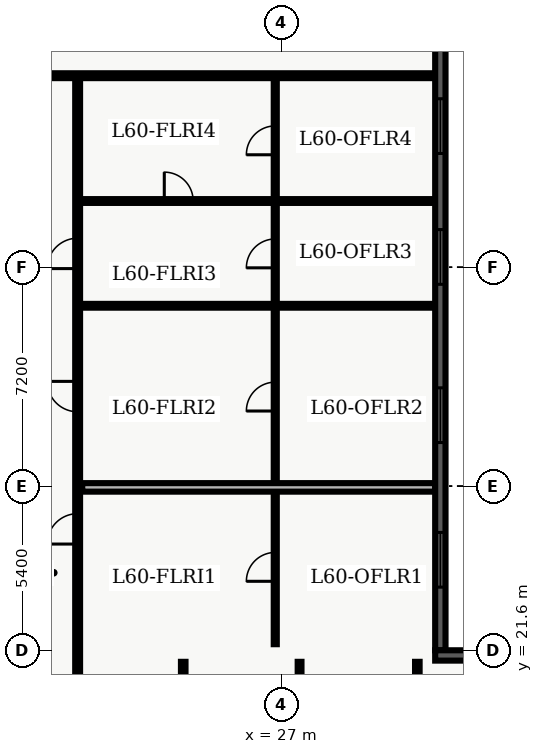
"""IFC4 building model, lengths in metres.
Left out: names, types, materials, properties, quantities, classifications, styles, units other than length and angle.
Written with IfcOpenShell. Run it as: python <this file> out.ifc"""

import sys

from ifc_helpers import new_model, entity, si_unit, converted_unit, direction, frame, origin_with_axes, origin_2d_with_axis, place, context, subcontext, project, spatial, polyline, rectangle, outline, extrude, element, fill, save


model = new_model("IFC4")
c1 = context("Model", 3, precision=1e-05, world=origin_with_axes(), true_north=direction((0.0, 1.0)))
c2 = subcontext(c1, "Body", "Model", "MODEL_VIEW")
j1 = project(units=[si_unit("LENGTHUNIT", "METRE"), converted_unit("PLANEANGLEUNIT", "DEGREE", entity("IfcPlaneAngleMeasure", 0.017), si_unit("PLANEANGLEUNIT", "RADIAN"), dimensions=[0, 0, 0, 0, 0, 0, 0])], contexts=[c1])
p1 = place(None, origin_with_axes())
s1 = spatial("IfcSite", under=j1, at=p1, CompositionType="ELEMENT")
p2 = place(p1, origin_with_axes())
s2 = spatial("IfcBuilding", under=s1, at=p2, CompositionType="ELEMENT")
p3 = place(p2, frame((0.0, 0.0, 244.2), z_axis=(0.0, 0.0, 1.0), x_axis=(1.0, 0.0, 0.0)))
s3 = spatial("IfcBuildingStorey", under=s2, at=p3, CompositionType="ELEMENT", Elevation=244.2)
p4 = place(p3, frame((7.1, 40.5, 0.0), z_axis=(0.0, 0.0, 1.0), x_axis=(1.0, 0.0, 0.0)))
e1 = element("IfcWall", 1, at=p4, inside=s3, PredefinedType="PARTITIONING", context=c2, shape_type="SweptSolid", body=[
    extrude(outline(polyline([(0.0, -0.08), (24.965, -0.08), (24.965, 0.08), (0.0, 0.08), (0.0, -0.08)])), origin_with_axes(), (0.0, 0.0, 1.0), 2.64),
])
p5 = place(p4, frame((4.38, 0.0, 0.0), z_axis=(0.0, 0.0, 1.0), x_axis=(1.0, 0.0, 0.0)))
e2 = element("IfcOpeningElement", 2, at=p5, cuts=e1, PredefinedType="OPENING", context=c2, shape_type="SweptSolid", body=[
    extrude(rectangle(XDim=1.0, YDim=0.18, at=origin_2d_with_axis()), origin_with_axes(), (0.0, 0.0, 1.0), 2.15),
])
p6 = place(p4, frame((7.566, 0.0, 0.0), z_axis=(0.0, 0.0, 1.0), x_axis=(1.0, 0.0, 0.0)))
e3 = element("IfcOpeningElement", 3, at=p6, cuts=e1, PredefinedType="OPENING", context=c2, shape_type="SweptSolid", body=[
    extrude(rectangle(XDim=1.0, YDim=0.18, at=origin_2d_with_axis()), origin_with_axes(), (0.0, 0.0, 1.0), 2.15),
])
p7 = place(p4, frame((11.129, 0.0, 0.0), z_axis=(0.0, 0.0, 1.0), x_axis=(1.0, 0.0, 0.0)))
e4 = element("IfcOpeningElement", 4, at=p7, cuts=e1, PredefinedType="OPENING", context=c2, shape_type="SweptSolid", body=[
    extrude(rectangle(XDim=1.0, YDim=0.18, at=origin_2d_with_axis()), origin_with_axes(), (0.0, 0.0, 1.0), 2.15),
])
p8 = place(p3, frame((20.3, 7.8, 0.0), z_axis=(0.0, 0.0, 1.0), x_axis=(0.0, 1.0, 0.0)))
e5 = element("IfcWall", 5, at=p8, inside=s3, PredefinedType="PARTITIONING", context=c2, shape_type="SweptSolid", body=[
    extrude(outline(polyline([(0.0, -0.08), (32.7, -0.08), (32.7, 0.08), (0.0, 0.08), (0.0, -0.08)])), origin_with_axes(), (0.0, 0.0, 1.0), 2.64),
])
p9 = place(p8, frame((17.794, 0.0, 0.0), z_axis=(0.0, 0.0, 1.0), x_axis=(1.0, 0.0, 0.0)))
e6 = element("IfcOpeningElement", 6, at=p9, cuts=e5, PredefinedType="OPENING", context=c2, shape_type="SweptSolid", body=[
    extrude(rectangle(XDim=1.0, YDim=0.18, at=origin_2d_with_axis()), origin_with_axes(), (0.0, 0.0, 1.0), 2.15),
])
p10 = place(p8, frame((22.145, 0.0, 0.0), z_axis=(0.0, 0.0, 1.0), x_axis=(1.0, 0.0, 0.0)))
e7 = element("IfcOpeningElement", 7, at=p10, cuts=e5, PredefinedType="OPENING", context=c2, shape_type="SweptSolid", body=[
    extrude(rectangle(XDim=1.0, YDim=0.18, at=origin_2d_with_axis()), origin_with_axes(), (0.0, 0.0, 1.0), 2.15),
])
p11 = place(p8, frame((26.855, 0.0, 0.0), z_axis=(0.0, 0.0, 1.0), x_axis=(1.0, 0.0, 0.0)))
e8 = element("IfcOpeningElement", 8, at=p11, cuts=e5, PredefinedType="OPENING", context=c2, shape_type="SweptSolid", body=[
    extrude(rectangle(XDim=1.0, YDim=0.18, at=origin_2d_with_axis()), origin_with_axes(), (0.0, 0.0, 1.0), 2.15),
])
p12 = place(p8, frame((5.775, 0.0, 0.0), z_axis=(0.0, 0.0, 1.0), x_axis=(1.0, 0.0, 0.0)))
e9 = element("IfcOpeningElement", 9, at=p12, cuts=e5, PredefinedType="OPENING", context=c2, shape_type="SweptSolid", body=[
    extrude(rectangle(XDim=1.05, YDim=0.18, at=origin_2d_with_axis()), origin_with_axes(), (0.0, 0.0, 1.0), 2.15),
])
p13 = place(p3, frame((26.8, 21.8, 0.0), z_axis=(0.0, 0.0, 1.0), x_axis=(0.0, 1.0, 0.0)))
e10 = element("IfcWall", 10, at=p13, inside=s3, PredefinedType="PARTITIONING", context=c2, shape_type="SweptSolid", body=[
    extrude(outline(polyline([(0.0, -0.05), (18.5, -0.05), (18.5, 0.05), (0.0, 0.05), (0.0, -0.05)])), origin_with_axes(), (0.0, 0.0, 1.0), 2.64),
])
p14 = place(p13, frame((2.544, 0.0, 0.0), z_axis=(0.0, 0.0, 1.0), x_axis=(1.0, 0.0, 0.0)))
e11 = element("IfcOpeningElement", 11, at=p14, cuts=e10, PredefinedType="OPENING", context=c2, shape_type="SweptSolid", body=[
    extrude(rectangle(XDim=0.95, YDim=0.12, at=origin_2d_with_axis()), origin_with_axes(), (0.0, 0.0, 1.0), 2.15),
])
p15 = place(p13, frame((8.145, 0.0, 0.0), z_axis=(0.0, 0.0, 1.0), x_axis=(1.0, 0.0, 0.0)))
e12 = element("IfcOpeningElement", 12, at=p15, cuts=e10, PredefinedType="OPENING", context=c2, shape_type="SweptSolid", body=[
    extrude(rectangle(XDim=0.95, YDim=0.12, at=origin_2d_with_axis()), origin_with_axes(), (0.0, 0.0, 1.0), 2.15),
])
p16 = place(p13, frame((12.855, 0.0, 0.0), z_axis=(0.0, 0.0, 1.0), x_axis=(1.0, 0.0, 0.0)))
e13 = element("IfcOpeningElement", 13, at=p16, cuts=e10, PredefinedType="OPENING", context=c2, shape_type="SweptSolid", body=[
    extrude(rectangle(XDim=0.95, YDim=0.12, at=origin_2d_with_axis()), origin_with_axes(), (0.0, 0.0, 1.0), 2.15),
])
p17 = place(p13, frame((16.574, 0.0, 0.0), z_axis=(0.0, 0.0, 1.0), x_axis=(1.0, 0.0, 0.0)))
e14 = element("IfcOpeningElement", 14, at=p17, cuts=e10, PredefinedType="OPENING", context=c2, shape_type="SweptSolid", body=[
    extrude(rectangle(XDim=0.95, YDim=0.12, at=origin_2d_with_axis()), origin_with_axes(), (0.0, 0.0, 1.0), 2.15),
])
p18 = place(p3, frame((20.45, 26.958, 0.0), z_axis=(0.0, 0.0, 1.0), x_axis=(1.0, 0.0, 0.0)))
e15 = element("IfcWall", 15, at=p18, inside=s3, PredefinedType="PARTITIONING", context=c2, shape_type="SweptSolid", body=[
    extrude(outline(polyline([(0.0, -0.14), (11.615, -0.14), (11.615, 0.14), (0.0, 0.14), (0.0, -0.14)])), origin_with_axes(), (0.0, 0.0, 1.0), 2.64),
])
p19 = place(p3, frame((20.45, 32.932, 0.0), z_axis=(0.0, 0.0, 1.0), x_axis=(1.0, 0.0, 0.0)))
e16 = element("IfcWall", 16, at=p19, inside=s3, PredefinedType="PARTITIONING", context=c2, shape_type="SweptSolid", body=[
    extrude(outline(polyline([(0.0, -0.062), (11.615, -0.062), (11.615, 0.062), (0.0, 0.062), (0.0, -0.062)])), origin_with_axes(), (0.0, 0.0, 1.0), 2.64),
])
p20 = place(p3, frame((20.45, 36.378, 0.0), z_axis=(0.0, 0.0, 1.0), x_axis=(1.0, 0.0, 0.0)))
e17 = element("IfcWall", 17, at=p20, inside=s3, PredefinedType="PARTITIONING", context=c2, shape_type="SweptSolid", body=[
    extrude(outline(polyline([(0.0, -0.062), (11.615, -0.062), (11.615, 0.062), (0.0, 0.062), (0.0, -0.062)])), origin_with_axes(), (0.0, 0.0, 1.0), 2.64),
])
p21 = place(p20, frame((3.175, 0.0, 0.0), z_axis=(0.0, 0.0, 1.0), x_axis=(1.0, 0.0, 0.0)))
e18 = element("IfcOpeningElement", 18, at=p21, cuts=e17, PredefinedType="OPENING", context=c2, shape_type="SweptSolid", body=[
    extrude(rectangle(XDim=0.95, YDim=0.145, at=origin_2d_with_axis()), origin_with_axes(), (0.0, 0.0, 1.0), 2.15),
])
p22 = place(p3, frame((23.773, 15.02, 0.0), z_axis=(0.0, 0.0, 1.0), x_axis=(0.0, 1.0, 0.0)))
e19 = element("IfcWall", 19, at=p22, inside=s3, PredefinedType="PARTITIONING", context=c2, shape_type="SweptSolid", body=[
    extrude(outline(polyline([(0.0, -0.075), (6.2, -0.075), (6.2, 0.075), (0.0, 0.075), (0.0, -0.075)])), origin_with_axes(), (0.0, 0.0, 1.0), 2.64),
])
p23 = place(p3, frame((27.6, 15.02, 0.0), z_axis=(0.0, 0.0, 1.0), x_axis=(0.0, 1.0, 0.0)))
e20 = element("IfcWall", 20, at=p23, inside=s3, PredefinedType="PARTITIONING", context=c2, shape_type="SweptSolid", body=[
    extrude(outline(polyline([(0.0, -0.062), (6.2, -0.062), (6.2, 0.062), (0.0, 0.062), (0.0, -0.062)])), origin_with_axes(), (0.0, 0.0, 1.0), 2.64),
])
p24 = place(p3, frame((31.473, 15.02, 0.0), z_axis=(0.0, 0.0, 1.0), x_axis=(0.0, 1.0, 0.0)))
e21 = element("IfcWall", 21, at=p24, inside=s3, PredefinedType="PARTITIONING", context=c2, shape_type="SweptSolid", body=[
    extrude(outline(polyline([(0.0, -0.075), (6.2, -0.075), (6.2, 0.075), (0.0, 0.075), (0.0, -0.075)])), origin_with_axes(), (0.0, 0.0, 1.0), 2.64),
])
p25 = place(p3, frame((32.23, 41.82, 0.0), z_axis=(0.0, 0.0, 1.0), x_axis=(0.0, -1.0, 0.0)))
e22 = element("IfcWall", 22, at=p25, inside=s3, PredefinedType="SOLIDWALL", context=c2, shape_type="SweptSolid", body=[
    extrude(outline(polyline([(0.0, -0.17), (20.22, -0.17), (20.22, 0.17), (0.0, 0.17), (0.0, -0.17)])), origin_with_axes(), (0.0, 0.0, 1.0), 3.6),
])
p26 = place(p25, frame((2.978, 0.0, 0.45), z_axis=(0.0, 0.0, 1.0), x_axis=(1.0, 0.0, 0.0)))
e23 = element("IfcOpeningElement", 23, at=p26, cuts=e22, PredefinedType="OPENING", context=c2, shape_type="SweptSolid", body=[
    extrude(rectangle(XDim=1.8, YDim=0.36, at=origin_2d_with_axis()), origin_with_axes(), (0.0, 0.0, 1.0), 2.1),
])
p27 = place(p25, frame((7.282, 0.0, 0.45), z_axis=(0.0, 0.0, 1.0), x_axis=(1.0, 0.0, 0.0)))
e24 = element("IfcOpeningElement", 24, at=p27, cuts=e22, PredefinedType="OPENING", context=c2, shape_type="SweptSolid", body=[
    extrude(rectangle(XDim=1.8, YDim=0.36, at=origin_2d_with_axis()), origin_with_axes(), (0.0, 0.0, 1.0), 2.1),
])
p28 = place(p25, frame((12.487, 0.0, 0.45), z_axis=(0.0, 0.0, 1.0), x_axis=(1.0, 0.0, 0.0)))
e25 = element("IfcOpeningElement", 25, at=p28, cuts=e22, PredefinedType="OPENING", context=c2, shape_type="SweptSolid", body=[
    extrude(rectangle(XDim=1.8, YDim=0.36, at=origin_2d_with_axis()), origin_with_axes(), (0.0, 0.0, 1.0), 2.1),
])
p29 = place(p25, frame((17.243, 0.0, 0.45), z_axis=(0.0, 0.0, 1.0), x_axis=(1.0, 0.0, 0.0)))
e26 = element("IfcOpeningElement", 26, at=p29, cuts=e22, PredefinedType="OPENING", context=c2, shape_type="SweptSolid", body=[
    extrude(rectangle(XDim=1.8, YDim=0.36, at=origin_2d_with_axis()), origin_with_axes(), (0.0, 0.0, 1.0), 2.1),
])
p30 = place(p3, frame((32.06, 21.43, 0.0), z_axis=(0.0, 0.0, 1.0), x_axis=(1.0, 0.0, 0.0)))
e27 = element("IfcWall", 27, at=p30, inside=s3, PredefinedType="SOLIDWALL", context=c2, shape_type="SweptSolid", body=[
    extrude(outline(polyline([(0.0, -0.17), (3.94, -0.17), (3.94, 0.17), (0.0, 0.17), (0.0, -0.17)])), origin_with_axes(), (0.0, 0.0, 1.0), 3.6),
])
p31 = place(p13, frame((2.544, 0.0, 0.0), z_axis=(0.0, 0.0, 1.0), x_axis=(1.0, 0.0, 0.0)))
e28 = element("IfcDoor", 28, at=p31, inside=s3, OperationType="SINGLE_SWING_LEFT", PredefinedType="DOOR", context=c2, shape_type="SweptSolid", body=[
    extrude(rectangle(XDim=0.95, YDim=0.06, at=origin_2d_with_axis()), origin_with_axes(), (0.0, 0.0, 1.0), 2.15),
])
fill(e11, e28)
p32 = place(p8, frame((17.794, 0.0, 0.0), z_axis=(0.0, 0.0, 1.0), x_axis=(1.0, 0.0, 0.0)))
e29 = element("IfcDoor", 29, at=p32, inside=s3, OperationType="SINGLE_SWING_LEFT", PredefinedType="DOOR", context=c2, shape_type="SweptSolid", body=[
    extrude(rectangle(XDim=1.0, YDim=0.09, at=origin_2d_with_axis()), origin_with_axes(), (0.0, 0.0, 1.0), 2.15),
])
fill(e6, e29)
p33 = place(p13, frame((8.145, 0.0, 0.0), z_axis=(0.0, 0.0, 1.0), x_axis=(1.0, 0.0, 0.0)))
e30 = element("IfcDoor", 30, at=p33, inside=s3, OperationType="SINGLE_SWING_LEFT", PredefinedType="DOOR", context=c2, shape_type="SweptSolid", body=[
    extrude(rectangle(XDim=0.95, YDim=0.06, at=origin_2d_with_axis()), origin_with_axes(), (0.0, 0.0, 1.0), 2.15),
])
fill(e12, e30)
p34 = place(p8, frame((22.145, 0.0, 0.0), z_axis=(0.0, 0.0, 1.0), x_axis=(1.0, 0.0, 0.0)))
e31 = element("IfcDoor", 31, at=p34, inside=s3, OperationType="SINGLE_SWING_RIGHT", PredefinedType="DOOR", context=c2, shape_type="SweptSolid", body=[
    extrude(rectangle(XDim=1.0, YDim=0.09, at=origin_2d_with_axis()), origin_with_axes(), (0.0, 0.0, 1.0), 2.15),
])
fill(e7, e31)
p35 = place(p13, frame((12.855, 0.0, 0.0), z_axis=(0.0, 0.0, 1.0), x_axis=(1.0, 0.0, 0.0)))
e32 = element("IfcDoor", 32, at=p35, inside=s3, OperationType="SINGLE_SWING_LEFT", PredefinedType="DOOR", context=c2, shape_type="SweptSolid", body=[
    extrude(rectangle(XDim=0.95, YDim=0.06, at=origin_2d_with_axis()), origin_with_axes(), (0.0, 0.0, 1.0), 2.15),
])
fill(e13, e32)
p36 = place(p8, frame((26.855, 0.0, 0.0), z_axis=(0.0, 0.0, 1.0), x_axis=(1.0, 0.0, 0.0)))
e33 = element("IfcDoor", 33, at=p36, inside=s3, OperationType="SINGLE_SWING_LEFT", PredefinedType="DOOR", context=c2, shape_type="SweptSolid", body=[
    extrude(rectangle(XDim=1.0, YDim=0.09, at=origin_2d_with_axis()), origin_with_axes(), (0.0, 0.0, 1.0), 2.15),
])
fill(e8, e33)
p37 = place(p13, frame((16.574, 0.0, 0.0), z_axis=(0.0, 0.0, 1.0), x_axis=(1.0, 0.0, 0.0)))
e34 = element("IfcDoor", 34, at=p37, inside=s3, OperationType="SINGLE_SWING_LEFT", PredefinedType="DOOR", context=c2, shape_type="SweptSolid", body=[
    extrude(rectangle(XDim=0.95, YDim=0.06, at=origin_2d_with_axis()), origin_with_axes(), (0.0, 0.0, 1.0), 2.15),
])
fill(e14, e34)
p38 = place(p20, frame((3.175, 0.0, 0.0), z_axis=(0.0, 0.0, 1.0), x_axis=(1.0, 0.0, 0.0)))
e35 = element("IfcDoor", 35, at=p38, inside=s3, OperationType="SINGLE_SWING_LEFT", PredefinedType="DOOR", context=c2, shape_type="SweptSolid", body=[
    extrude(rectangle(XDim=0.95, YDim=0.075, at=origin_2d_with_axis()), origin_with_axes(), (0.0, 0.0, 1.0), 2.15),
])
fill(e18, e35)
p39 = place(p25, frame((2.978, 0.0, 0.45), z_axis=(0.0, 0.0, 1.0), x_axis=(1.0, 0.0, 0.0)))
e36 = element("IfcWindow", 36, at=p39, inside=s3, PredefinedType="WINDOW", context=c2, shape_type="SweptSolid", body=[
    extrude(rectangle(XDim=1.8, YDim=0.09, at=origin_2d_with_axis()), origin_with_axes(), (0.0, 0.0, 1.0), 2.1),
])
fill(e23, e36)
p40 = place(p25, frame((7.282, 0.0, 0.45), z_axis=(0.0, 0.0, 1.0), x_axis=(1.0, 0.0, 0.0)))
e37 = element("IfcWindow", 37, at=p40, inside=s3, PredefinedType="WINDOW", context=c2, shape_type="SweptSolid", body=[
    extrude(rectangle(XDim=1.8, YDim=0.09, at=origin_2d_with_axis()), origin_with_axes(), (0.0, 0.0, 1.0), 2.1),
])
fill(e24, e37)
p41 = place(p25, frame((12.487, 0.0, 0.45), z_axis=(0.0, 0.0, 1.0), x_axis=(1.0, 0.0, 0.0)))
e38 = element("IfcWindow", 38, at=p41, inside=s3, PredefinedType="WINDOW", context=c2, shape_type="SweptSolid", body=[
    extrude(rectangle(XDim=1.8, YDim=0.09, at=origin_2d_with_axis()), origin_with_axes(), (0.0, 0.0, 1.0), 2.1),
])
fill(e25, e38)
p42 = place(p25, frame((17.243, 0.0, 0.45), z_axis=(0.0, 0.0, 1.0), x_axis=(1.0, 0.0, 0.0)))
e39 = element("IfcWindow", 39, at=p42, inside=s3, PredefinedType="WINDOW", context=c2, shape_type="SweptSolid", body=[
    extrude(rectangle(XDim=1.8, YDim=0.09, at=origin_2d_with_axis()), origin_with_axes(), (0.0, 0.0, 1.0), 2.1),
])
fill(e26, e39)
save(model, sys.argv[1])
